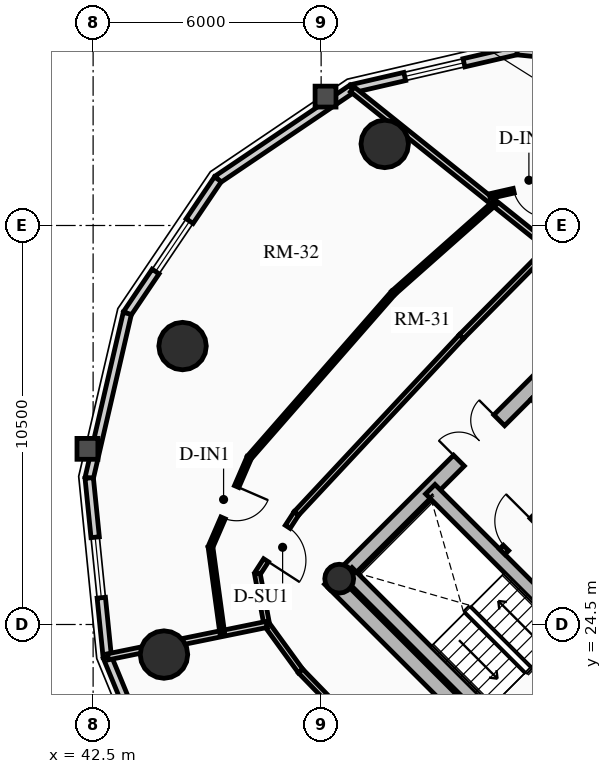
"""IFC4 building model, lengths in metres.
Left out: names, types, materials, properties, quantities, classifications, styles, units other than length and angle.
Written with IfcOpenShell. Run it as: python <this file> out.ifc"""

import sys

from ifc_helpers import new_model, si_unit, direction, frame, frame_2d, origin, origin_2d, place, context, subcontext, project, spatial, rectangle, circle, hollow_circle, extrude, source, transform, mapped, element, fill, save


model = new_model("IFC4")
c1 = context("Model", 3, precision=1e-05, world=origin(), true_north=direction((0.0, 1.0)))
c2 = subcontext(c1, "Body", "Model", "MODEL_VIEW")
j1 = project(units=[si_unit("LENGTHUNIT", "METRE"), si_unit("PLANEANGLEUNIT", "RADIAN")], contexts=[c1])
p1 = place(None, origin())
s1 = spatial("IfcSite", under=j1, at=p1, CompositionType="ELEMENT")
p2 = place(p1, origin())
s2 = spatial("IfcBuilding", under=s1, at=p2, CompositionType="ELEMENT")
p3 = place(p2, frame((0.0, 0.0, 174.88)))
s3 = spatial("IfcBuildingStorey", under=s2, at=p3, CompositionType="ELEMENT", Elevation=174.88)
p4 = place(p3, frame((58.702, 15.732, 0.0), z_axis=(0.0, 0.0, 1.0), x_axis=(-0.707106781187, 0.707106781187, 0.0)))
e1 = element("IfcWall", 1, at=p4, inside=s3, PredefinedType="SHEAR", context=c2, shape_type="SweptSolid", body=[
    extrude(rectangle(XDim=14.1, YDim=0.4, at=frame_2d((7.05, 0.0))), origin(), (0.0, 0.0, 1.0), 2.91),
])
p5 = place(p3, frame((48.873, 25.561, 0.0), z_axis=(0.0, 0.0, 1.0), x_axis=(0.707106781187, 0.707106781187, 0.0)))
e2 = element("IfcWall", 2, at=p5, inside=s3, PredefinedType="SHEAR", context=c2, shape_type="SweptSolid", body=[
    extrude(rectangle(XDim=10.7, YDim=0.4, at=frame_2d((5.35, 0.0))), origin(), (0.0, 0.0, 1.0), 2.91),
])
m1 = source(origin(), c2, "Body", "SweptSolid", [
    extrude(rectangle(XDim=1.5, YDim=2.02, at=frame_2d((0.75, 1.01))), frame((0.0, 0.21, 0.0), z_axis=(0.0, -1.0, 0.0), x_axis=(1.0, 0.0, 0.0)), (0.0, 0.0, 1.0), 0.42),
])
p6 = place(p5, frame((4.6, 0.0, 0.0)))
e3 = element("IfcOpeningElement", 3, at=p6, cuts=e2, PredefinedType="OPENING", context=c2, shape_type="MappedRepresentation", body=[
    mapped(m1, transform((0.0, 0.0, 0.0), x_axis=(1.0, 0.0, 0.0), y_axis=(0.0, 1.0, 0.0), z_axis=(0.0, 0.0, 1.0), scale=1.0)),
])
p7 = place(p3, frame((61.06, 18.373, 0.0), z_axis=(0.0, 0.0, 1.0), x_axis=(-0.707106781187, 0.707106781187, 0.0)))
e4 = element("IfcWall", 4, at=p7, inside=s3, PredefinedType="SHEAR", context=c2, shape_type="SweptSolid", body=[
    extrude(rectangle(XDim=13.7, YDim=0.35, at=frame_2d((6.85, 0.0))), origin(), (0.0, 0.0, 1.0), 2.91),
])
m2 = source(origin(), c2, "Body", "SweptSolid", [
    extrude(rectangle(XDim=1.1, YDim=2.015, at=frame_2d((0.55, 1.007))), frame((0.0, 0.185, 0.0), z_axis=(0.0, -1.0, 0.0), x_axis=(1.0, 0.0, 0.0)), (0.0, 0.0, 1.0), 0.37),
])
p8 = place(p7, frame((4.85, 0.0, 0.0)))
e5 = element("IfcOpeningElement", 5, at=p8, cuts=e4, PredefinedType="OPENING", context=c2, shape_type="MappedRepresentation", body=[
    mapped(m2, transform((0.0, 0.0, 0.0), x_axis=(1.0, 0.0, 0.0), y_axis=(0.0, 1.0, 0.0), z_axis=(0.0, 0.0, 1.0), scale=1.0)),
])
p9 = place(p7, frame((0.625, 0.0, 0.0)))
e6 = element("IfcOpeningElement", 6, at=p9, cuts=e4, PredefinedType="OPENING", context=c2, shape_type="MappedRepresentation", body=[
    mapped(m2, transform((0.0, 0.0, 0.0), x_axis=(1.0, 0.0, 0.0), y_axis=(0.0, 1.0, 0.0), z_axis=(0.0, 0.0, 1.0), scale=1.0)),
])
p10 = place(p7, frame((2.625, 0.0, 0.0)))
e7 = element("IfcOpeningElement", 7, at=p10, cuts=e4, PredefinedType="OPENING", context=c2, shape_type="MappedRepresentation", body=[
    mapped(m2, transform((0.0, 0.0, 0.0), x_axis=(1.0, 0.0, 0.0), y_axis=(0.0, 1.0, 0.0), z_axis=(0.0, 0.0, 1.0), scale=1.0)),
])
m3 = source(origin(), c2, "Body", "SweptSolid", [
    extrude(rectangle(XDim=1.15, YDim=2.02, at=frame_2d((0.575, 1.01))), frame((0.0, 0.185, 0.0), z_axis=(0.0, -1.0, 0.0), x_axis=(1.0, 0.0, 0.0)), (0.0, 0.0, 1.0), 0.37),
])
p11 = place(p7, frame((7.27, 0.0, 0.0)))
e8 = element("IfcOpeningElement", 8, at=p11, cuts=e4, PredefinedType="OPENING", context=c2, shape_type="MappedRepresentation", body=[
    mapped(m3, transform((0.0, 0.0, 0.0), x_axis=(1.0, 0.0, 0.0), y_axis=(0.0, 1.0, 0.0), z_axis=(0.0, 0.0, 1.0), scale=1.0)),
])
p12 = place(p3, frame((53.922, 21.141, 0.0), z_axis=(0.0, 0.0, 1.0), x_axis=(-0.707106781187, 0.707106781187, 0.0)))
e9 = element("IfcWall", 9, at=p12, inside=s3, PredefinedType="SHEAR", context=c2, shape_type="SweptSolid", body=[
    extrude(rectangle(XDim=6.695, YDim=0.35, at=frame_2d((3.348, 0.0))), origin(), (0.0, 0.0, 1.0), 2.91),
])
p13 = place(p3, frame((53.784, 21.003, 0.0), z_axis=(0.0, 0.0, 1.0), x_axis=(0.707106781187, 0.707106781187, 0.0)))
e10 = element("IfcWall", 10, at=p13, inside=s3, PredefinedType="SHEAR", context=c2, shape_type="SweptSolid", body=[
    extrude(rectangle(XDim=3.285, YDim=0.35, at=frame_2d((1.643, 0.0))), origin(), (0.0, 0.0, 1.0), 2.91),
])
p14 = place(p3, frame((48.976, 25.706, 0.0), z_axis=(0.0, 0.0, 1.0), x_axis=(0.707106781187, 0.707106781187, 0.0)))
e11 = element("IfcColumn", 11, at=p14, inside=s3, PredefinedType="COLUMN", context=c2, shape_type="SweptSolid", body=[
    extrude(hollow_circle(Radius=0.38, WallThickness=0.032, at=origin_2d()), origin(), (0.0, 0.0, 1.0), 2.91),
])
for number, where, z_axis, x_axis in (
    (12, (50.173, 37.146, 0.0), (0.0, 0.0, 1.0), (1.0, 0.0, 0.0)),
    (13, (44.854, 31.827, 0.0), (0.0, 0.0, 1.0), (1.0, 0.0, 0.0)),
    (14, (44.365, 23.709, 0.0), (0.0, 0.0, 1.0), (1.0, 0.0, 0.0)),
):
    element("IfcColumn", number, at=place(p3, frame(where, z_axis=z_axis, x_axis=x_axis)), inside=s3, PredefinedType="USERDEFINED", context=c2, shape_type="SweptSolid", body=[
        extrude(circle(Radius=0.625, at=origin_2d()), origin(), (0.0, 0.0, 1.0), 2.91),
    ])
p15 = place(p3, frame((53.645, 39.603, 0.0), z_axis=(0.0, 0.0, 1.0), x_axis=(0.994943283129, -0.100438356004, 0.0)))
e15 = element("IfcWall", 15, at=p15, inside=s3, PredefinedType="SOLIDWALL", context=c2, shape_type="SweptSolid", body=[
    extrude(rectangle(XDim=4.733, YDim=0.22, at=frame_2d((2.366, 0.0))), origin(), (0.0, 0.0, 1.0), 2.245),
])
m4 = source(origin(), c2, "Body", "SweptSolid", [
    extrude(rectangle(XDim=1.6, YDim=1.3, at=frame_2d((0.8, 0.65))), frame((0.0, 0.12, 0.0), z_axis=(0.0, -1.0, 0.0), x_axis=(1.0, 0.0, 0.0)), (0.0, 0.0, 1.0), 0.24),
])
p16 = place(p15, frame((1.566, 0.0, 0.65)))
e16 = element("IfcOpeningElement", 16, at=p16, cuts=e15, PredefinedType="OPENING", context=c2, shape_type="MappedRepresentation", body=[
    mapped(m4, transform((0.0, 0.0, 0.0), x_axis=(1.0, 0.0, 0.0), y_axis=(0.0, 1.0, 0.0), z_axis=(0.0, 0.0, 1.0), scale=1.0)),
])
p17 = place(p3, frame((49.313, 38.6, 0.0), z_axis=(0.0, 0.0, 1.0), x_axis=(0.97422620202, 0.22557328587, 0.0)))
e17 = element("IfcWall", 17, at=p17, inside=s3, PredefinedType="SOLIDWALL", context=c2, shape_type="SweptSolid", body=[
    extrude(rectangle(XDim=4.446, YDim=0.22, at=frame_2d((2.223, 0.0))), origin(), (0.0, 0.0, 1.0), 2.245),
])
p18 = place(p17, frame((1.423, 0.0, 0.65)))
e18 = element("IfcOpeningElement", 18, at=p18, cuts=e17, PredefinedType="OPENING", context=c2, shape_type="MappedRepresentation", body=[
    mapped(m4, transform((0.0, 0.0, 0.0), x_axis=(1.0, 0.0, 0.0), y_axis=(0.0, 1.0, 0.0), z_axis=(0.0, 0.0, 1.0), scale=1.0)),
])
p19 = place(p3, frame((45.783, 36.217, 0.0), z_axis=(0.0, 0.0, 1.0), x_axis=(0.828817439852, 0.55951912514, 0.0)))
e19 = element("IfcWall", 19, at=p19, inside=s3, PredefinedType="SOLIDWALL", context=c2, shape_type="SweptSolid", body=[
    extrude(rectangle(XDim=4.259, YDim=0.22, at=frame_2d((2.129, 0.0))), origin(), (0.0, 0.0, 1.0), 2.245),
])
p20 = place(p3, frame((43.4, 32.687, 0.0), z_axis=(0.0, 0.0, 1.0), x_axis=(0.55951912514, 0.828817439852, 0.0)))
e20 = element("IfcWall", 20, at=p20, inside=s3, PredefinedType="SOLIDWALL", context=c2, shape_type="SweptSolid", body=[
    extrude(rectangle(XDim=4.259, YDim=0.22, at=frame_2d((2.129, 0.0))), origin(), (0.0, 0.0, 1.0), 2.245),
])
p21 = place(p20, frame((1.33, 0.0, 0.65)))
e21 = element("IfcOpeningElement", 21, at=p21, cuts=e20, PredefinedType="OPENING", context=c2, shape_type="MappedRepresentation", body=[
    mapped(m4, transform((0.0, 0.0, 0.0), x_axis=(1.0, 0.0, 0.0), y_axis=(0.0, 1.0, 0.0), z_axis=(0.0, 0.0, 1.0), scale=1.0)),
])
p22 = place(p3, frame((42.397, 28.355, 0.0), z_axis=(0.0, 0.0, 1.0), x_axis=(0.22557328587, 0.97422620202, 0.0)))
e22 = element("IfcWall", 22, at=p22, inside=s3, PredefinedType="SOLIDWALL", context=c2, shape_type="SweptSolid", body=[
    extrude(rectangle(XDim=4.446, YDim=0.22, at=frame_2d((2.223, 0.0))), origin(), (0.0, 0.0, 1.0), 2.245),
])
p23 = place(p3, frame((42.873, 23.646, 0.0), z_axis=(0.0, 0.0, 1.0), x_axis=(-0.100438356004, 0.994943283129, 0.0)))
e23 = element("IfcWall", 23, at=p23, inside=s3, PredefinedType="SOLIDWALL", context=c2, shape_type="SweptSolid", body=[
    extrude(rectangle(XDim=4.733, YDim=0.22, at=frame_2d((2.366, 0.0))), origin(), (0.0, 0.0, 1.0), 2.245),
])
p24 = place(p23, frame((1.566, 0.0, 0.65)))
e24 = element("IfcOpeningElement", 24, at=p24, cuts=e23, PredefinedType="OPENING", context=c2, shape_type="MappedRepresentation", body=[
    mapped(m4, transform((0.0, 0.0, 0.0), x_axis=(1.0, 0.0, 0.0), y_axis=(0.0, 1.0, 0.0), z_axis=(0.0, 0.0, 1.0), scale=1.0)),
])
p25 = place(p3, frame((44.78, 19.021, 0.0), z_axis=(0.0, 0.0, 1.0), x_axis=(-0.381196434348, 0.924494066201, 0.0)))
e25 = element("IfcWall", 25, at=p25, inside=s3, PredefinedType="SOLIDWALL", context=c2, shape_type="SweptSolid", body=[
    extrude(rectangle(XDim=5.003, YDim=0.22, at=frame_2d((2.501, 0.0))), origin(), (0.0, 0.0, 1.0), 2.245),
])
p26 = place(p25, frame((1.702, 0.0, 0.65)))
e26 = element("IfcOpeningElement", 26, at=p26, cuts=e25, PredefinedType="OPENING", context=c2, shape_type="MappedRepresentation", body=[
    mapped(m4, transform((0.0, 0.0, 0.0), x_axis=(1.0, 0.0, 0.0), y_axis=(0.0, 1.0, 0.0), z_axis=(0.0, 0.0, 1.0), scale=1.0)),
])
p27 = place(p3, frame((53.264, 26.416, 0.0), z_axis=(0.0, 0.0, 1.0), x_axis=(0.707106781187, 0.707106781187, 0.0)))
e27 = element("IfcWall", 27, at=p27, inside=s3, PredefinedType="PARTITIONING", context=c2, shape_type="SweptSolid", body=[
    extrude(rectangle(XDim=3.28, YDim=0.2, at=frame_2d((1.64, 0.0))), origin(), (0.0, 0.0, 1.0), 2.675),
])
m5 = source(origin(), c2, "Body", "SweptSolid", [
    extrude(rectangle(XDim=1.0, YDim=2.015, at=frame_2d((0.5, 1.007))), frame((0.0, 0.11, 0.0), z_axis=(0.0, -1.0, 0.0), x_axis=(1.0, 0.0, 0.0)), (0.0, 0.0, 1.0), 0.22),
])
p28 = place(p27, frame((0.14, 0.0, 0.0)))
e28 = element("IfcOpeningElement", 28, at=p28, cuts=e27, PredefinedType="OPENING", context=c2, shape_type="MappedRepresentation", body=[
    mapped(m5, transform((0.0, 0.0, 0.0), x_axis=(1.0, 0.0, 0.0), y_axis=(0.0, 1.0, 0.0), z_axis=(0.0, 0.0, 1.0), scale=1.0)),
])
m6 = source(origin(), c2, "Body", "SweptSolid", [
    extrude(rectangle(XDim=0.9, YDim=2.005, at=frame_2d((0.45, 1.002))), frame((0.0, 0.11, 0.0), z_axis=(0.0, -1.0, 0.0), x_axis=(1.0, 0.0, 0.0)), (0.0, 0.0, 1.0), 0.22),
])
p29 = place(p27, frame((2.05, 0.0, 0.0)))
e29 = element("IfcOpeningElement", 29, at=p29, cuts=e27, PredefinedType="OPENING", context=c2, shape_type="MappedRepresentation", body=[
    mapped(m6, transform((0.0, 0.0, 0.0), x_axis=(1.0, 0.0, 0.0), y_axis=(0.0, 1.0, 0.0), z_axis=(0.0, 0.0, 1.0), scale=1.0)),
])
p30 = place(p3, frame((56.839, 27.728, 0.0), z_axis=(0.0, 0.0, 1.0), x_axis=(-0.707106781187, 0.707106781187, 0.0)))
e30 = element("IfcWall", 30, at=p30, inside=s3, PredefinedType="PARTITIONING", context=c2, shape_type="SweptSolid", body=[
    extrude(rectangle(XDim=3.9, YDim=0.16, at=frame_2d((1.95, 0.0))), origin(), (0.0, 0.0, 1.0), 2.675),
])
m7 = source(origin(), c2, "Body", "SweptSolid", [
    extrude(rectangle(XDim=0.9, YDim=2.005, at=frame_2d((0.45, 1.002))), frame((0.0, 0.09, 0.0), z_axis=(0.0, -1.0, 0.0), x_axis=(1.0, 0.0, 0.0)), (0.0, 0.0, 1.0), 0.18),
])
p31 = place(p30, frame((2.2, 0.0, 0.0)))
e31 = element("IfcOpeningElement", 31, at=p31, cuts=e30, PredefinedType="OPENING", context=c2, shape_type="MappedRepresentation", body=[
    mapped(m7, transform((0.0, 0.0, 0.0), x_axis=(1.0, 0.0, 0.0), y_axis=(0.0, 1.0, 0.0), z_axis=(0.0, 0.0, 1.0), scale=1.0)),
])
p32 = place(p3, frame((54.514, 34.422, 0.0), z_axis=(0.0, 0.0, 1.0), x_axis=(-0.703289573518, -0.710903492593, 0.0)))
e32 = element("IfcWall", 32, at=p32, inside=s3, PredefinedType="PARTITIONING", context=c2, shape_type="SweptSolid", body=[
    extrude(rectangle(XDim=3.303, YDim=0.15, at=frame_2d((1.651, 0.0))), origin(), (0.0, 0.0, 1.0), 2.245),
])
p33 = place(p3, frame((52.191, 32.074, 0.0), z_axis=(0.0, 0.0, 1.0), x_axis=(-0.682404362608, -0.730974887321, 0.0)))
e33 = element("IfcWall", 33, at=p33, inside=s3, PredefinedType="PARTITIONING", context=c2, shape_type="SweptSolid", body=[
    extrude(rectangle(XDim=6.364, YDim=0.15, at=frame_2d((3.182, 0.0))), origin(), (0.0, 0.0, 1.0), 2.245),
])
p34 = place(p3, frame((47.849, 27.423, 0.0), z_axis=(0.0, 0.0, 1.0), x_axis=(-0.543529808582, -0.839389866023, 0.0)))
e34 = element("IfcWall", 34, at=p34, inside=s3, PredefinedType="PARTITIONING", context=c2, shape_type="SweptSolid", body=[
    extrude(rectangle(XDim=1.89, YDim=0.15, at=frame_2d((0.945, 0.0))), origin(), (0.0, 0.0, 1.0), 2.245),
])
m8 = source(origin(), c2, "Body", "SweptSolid", [
    extrude(rectangle(XDim=1.05, YDim=2.015, at=frame_2d((0.525, 1.007))), frame((0.0, 0.085, 0.0), z_axis=(0.0, -1.0, 0.0), x_axis=(1.0, 0.0, 0.0)), (0.0, 0.0, 1.0), 0.17),
])
p35 = place(p34, frame((0.42, 0.0, 0.0)))
e35 = element("IfcOpeningElement", 35, at=p35, cuts=e34, PredefinedType="OPENING", context=c2, shape_type="MappedRepresentation", body=[
    mapped(m8, transform((0.0, 0.0, 0.0), x_axis=(1.0, 0.0, 0.0), y_axis=(0.0, 1.0, 0.0), z_axis=(0.0, 0.0, 1.0), scale=1.0)),
])
p36 = place(p3, frame((46.822, 25.836, 0.0), z_axis=(0.0, 0.0, 1.0), x_axis=(0.182115036249, -0.983277231289, 0.0)))
e36 = element("IfcWall", 36, at=p36, inside=s3, PredefinedType="PARTITIONING", context=c2, shape_type="SweptSolid", body=[
    extrude(rectangle(XDim=1.357, YDim=0.15, at=frame_2d((0.678, 0.0))), origin(), (0.0, 0.0, 1.0), 2.245),
])
p37 = place(p3, frame((47.069, 24.502, 0.0), z_axis=(0.0, 0.0, 1.0), x_axis=(0.587577436866, -0.809167940347, 0.0)))
e37 = element("IfcWall", 37, at=p37, inside=s3, PredefinedType="PARTITIONING", context=c2, shape_type="SweptSolid", body=[
    extrude(rectangle(XDim=1.515, YDim=0.15, at=frame_2d((0.757, 0.0))), origin(), (0.0, 0.0, 1.0), 2.245),
])
p38 = place(p3, frame((47.959, 23.277, 0.0), z_axis=(0.0, 0.0, 1.0), x_axis=(0.696422573496, -0.717631938479, 0.0)))
e38 = element("IfcWall", 38, at=p38, inside=s3, PredefinedType="PARTITIONING", context=c2, shape_type="SweptSolid", body=[
    extrude(rectangle(XDim=5.882, YDim=0.15, at=frame_2d((2.941, 0.0))), origin(), (0.0, 0.0, 1.0), 2.675),
])
m9 = source(origin(), c2, "Body", "SweptSolid", [
    extrude(rectangle(XDim=1.0, YDim=2.015, at=frame_2d((0.5, 1.007))), frame((0.0, 0.085, 0.0), z_axis=(0.0, -1.0, 0.0), x_axis=(1.0, 0.0, 0.0)), (0.0, 0.0, 1.0), 0.17),
])
p39 = place(p38, frame((2.441, 0.0, 0.0)))
e39 = element("IfcOpeningElement", 39, at=p39, cuts=e38, PredefinedType="OPENING", context=c2, shape_type="MappedRepresentation", body=[
    mapped(m9, transform((0.0, 0.0, 0.0), x_axis=(1.0, 0.0, 0.0), y_axis=(0.0, 1.0, 0.0), z_axis=(0.0, 0.0, 1.0), scale=1.0)),
])
p40 = place(p3, frame((54.514, 34.422, 0.0), z_axis=(0.0, 0.0, 1.0), x_axis=(-0.780385234796, 0.625299036712, 0.0)))
e40 = element("IfcWall", 40, at=p40, inside=s3, PredefinedType="PARTITIONING", context=c2, shape_type="SweptSolid", body=[
    extrude(rectangle(XDim=6.653, YDim=0.16, at=frame_2d((3.326, 0.0))), origin(), (0.0, 0.0, 1.0), 2.245),
])
p41 = place(p3, frame((47.069, 24.502, 0.0), z_axis=(0.0, 0.0, 1.0), x_axis=(-0.979772902724, -0.200112616012, 0.0)))
e41 = element("IfcWall", 41, at=p41, inside=s3, PredefinedType="PARTITIONING", context=c2, shape_type="SweptSolid", body=[
    extrude(rectangle(XDim=4.263, YDim=0.16, at=frame_2d((2.131, 0.0))), origin(), (0.0, 0.0, 1.0), 2.245),
])
p42 = place(p3, frame((54.871, 36.211, 0.0), z_axis=(0.0, 0.0, 1.0), x_axis=(-0.975212623293, -0.221269833846, 0.0)))
e42 = element("IfcWall", 42, at=p42, inside=s3, PredefinedType="PARTITIONING", context=c2, shape_type="SweptSolid", body=[
    extrude(rectangle(XDim=1.983, YDim=0.125, at=frame_2d((0.991, 0.0))), origin(), (0.0, 0.0, 1.0), 2.312),
])
m10 = source(origin(), c2, "Body", "SweptSolid", [
    extrude(rectangle(XDim=0.9, YDim=2.005, at=frame_2d((0.45, 1.002))), frame((0.0, 0.073, 0.0), z_axis=(0.0, -1.0, 0.0), x_axis=(1.0, 0.0, 0.0)), (0.0, 0.0, 1.0), 0.145),
])
p43 = place(p42, frame((0.436, 0.0, 0.0)))
e43 = element("IfcOpeningElement", 43, at=p43, cuts=e42, PredefinedType="OPENING", context=c2, shape_type="MappedRepresentation", body=[
    mapped(m10, transform((0.0, 0.0, 0.0), x_axis=(1.0, 0.0, 0.0), y_axis=(0.0, 1.0, 0.0), z_axis=(0.0, 0.0, 1.0), scale=1.0)),
])
p44 = place(p3, frame((53.06, 35.587, 0.0), z_axis=(0.0, 0.0, 1.0), x_axis=(-0.748390346028, -0.663258539314, 0.0)))
e44 = element("IfcWall", 44, at=p44, inside=s3, PredefinedType="PARTITIONING", context=c2, shape_type="SweptSolid", body=[
    extrude(rectangle(XDim=3.553, YDim=0.125, at=frame_2d((1.777, 0.0))), origin(), (0.0, 0.0, 1.0), 2.245),
])
p45 = place(p3, frame((50.401, 33.23, 0.0), z_axis=(0.0, 0.0, 1.0), x_axis=(-0.658387591096, -0.752679068322, 0.0)))
e45 = element("IfcWall", 45, at=p45, inside=s3, PredefinedType="PARTITIONING", context=c2, shape_type="SweptSolid", body=[
    extrude(rectangle(XDim=5.761, YDim=0.125, at=frame_2d((2.88, 0.0))), origin(), (0.0, 0.0, 1.0), 2.245),
])
p46 = place(p3, frame((46.608, 28.894, 0.0), z_axis=(0.0, 0.0, 1.0), x_axis=(-0.397650183672, -0.917537100844, 0.0)))
e46 = element("IfcWall", 46, at=p46, inside=s3, PredefinedType="PARTITIONING", context=c2, shape_type="SweptSolid", body=[
    extrude(rectangle(XDim=2.564, YDim=0.125, at=frame_2d((1.282, 0.0))), origin(), (0.0, 0.0, 1.0), 2.245),
])
p47 = place(p46, frame((0.832, 0.0, 0.0)))
e47 = element("IfcOpeningElement", 47, at=p47, cuts=e46, PredefinedType="OPENING", context=c2, shape_type="MappedRepresentation", body=[
    mapped(m10, transform((0.0, 0.0, 0.0), x_axis=(1.0, 0.0, 0.0), y_axis=(0.0, 1.0, 0.0), z_axis=(0.0, 0.0, 1.0), scale=1.0)),
])
p48 = place(p3, frame((45.588, 26.541, 0.0), z_axis=(0.0, 0.0, 1.0), x_axis=(0.135321759641, -0.990801706381, 0.0)))
e48 = element("IfcWall", 48, at=p48, inside=s3, PredefinedType="PARTITIONING", context=c2, shape_type="SweptSolid", body=[
    extrude(rectangle(XDim=2.299, YDim=0.125, at=frame_2d((1.149, 0.0))), origin(), (0.0, 0.0, 1.0), 2.245),
])
m11 = source(origin(), c2, "Body", "SweptSolid", [
    extrude(rectangle(XDim=1.6, YDim=1.3, at=frame_2d((0.8, 0.65))), frame((0.0, 0.03, 0.0), z_axis=(0.0, -1.0, 0.0), x_axis=(1.0, 0.0, 0.0)), (0.0, 0.0, 1.0), 0.06),
])
p49 = place(p18, origin())
e49 = element("IfcWindow", 49, at=p49, inside=s3, PartitioningType="SINGLE_PANEL", PredefinedType="WINDOW", context=c2, shape_type="MappedRepresentation", body=[
    mapped(m11, transform((0.0, 0.0, 0.0), x_axis=(1.0, 0.0, 0.0), y_axis=(0.0, 1.0, 0.0), z_axis=(0.0, 0.0, 1.0), scale=1.0)),
])
fill(e18, e49)
p50 = place(p21, origin())
e50 = element("IfcWindow", 50, at=p50, inside=s3, PartitioningType="SINGLE_PANEL", PredefinedType="WINDOW", context=c2, shape_type="MappedRepresentation", body=[
    mapped(m11, transform((0.0, 0.0, 0.0), x_axis=(1.0, 0.0, 0.0), y_axis=(0.0, 1.0, 0.0), z_axis=(0.0, 0.0, 1.0), scale=1.0)),
])
fill(e21, e50)
p51 = place(p24, origin())
e51 = element("IfcWindow", 51, at=p51, inside=s3, PartitioningType="SINGLE_PANEL", PredefinedType="WINDOW", context=c2, shape_type="MappedRepresentation", body=[
    mapped(m11, transform((0.0, 0.0, 0.0), x_axis=(1.0, 0.0, 0.0), y_axis=(0.0, 1.0, 0.0), z_axis=(0.0, 0.0, 1.0), scale=1.0)),
])
fill(e24, e51)
m12 = source(origin(), c2, "Body", "SweptSolid", [
    extrude(rectangle(XDim=1.5, YDim=2.02, at=frame_2d((0.75, 1.01))), frame((0.0, 0.025, 0.0), z_axis=(0.0, -1.0, 0.0), x_axis=(1.0, 0.0, 0.0)), (0.0, 0.0, 1.0), 0.05),
])
p52 = place(p6, origin())
e52 = element("IfcDoor", 52, at=p52, inside=s3, OperationType="DOUBLE_DOOR_SINGLE_SWING", PredefinedType="DOOR", context=c2, shape_type="MappedRepresentation", body=[
    mapped(m12, transform((0.0, 0.0, 0.0), x_axis=(1.0, 0.0, 0.0), y_axis=(0.0, 1.0, 0.0), z_axis=(0.0, 0.0, 1.0), scale=1.0)),
])
fill(e3, e52)
m13 = source(origin(), c2, "Body", "SweptSolid", [
    extrude(rectangle(XDim=1.0, YDim=2.015, at=frame_2d((0.5, 1.007))), frame((0.0, 0.025, 0.0), z_axis=(0.0, -1.0, 0.0), x_axis=(1.0, 0.0, 0.0)), (0.0, 0.0, 1.0), 0.05),
])
p53 = place(p28, origin())
e53 = element("IfcDoor", 53, at=p53, inside=s3, OperationType="SINGLE_SWING_RIGHT", PredefinedType="DOOR", context=c2, shape_type="MappedRepresentation", body=[
    mapped(m13, transform((0.0, 0.0, 0.0), x_axis=(1.0, 0.0, 0.0), y_axis=(0.0, 1.0, 0.0), z_axis=(0.0, 0.0, 1.0), scale=1.0)),
])
fill(e28, e53)
m14 = source(origin(), c2, "Body", "SweptSolid", [
    extrude(rectangle(XDim=0.9, YDim=2.005, at=frame_2d((0.45, 1.002))), frame((0.0, 0.025, 0.0), z_axis=(0.0, -1.0, 0.0), x_axis=(1.0, 0.0, 0.0)), (0.0, 0.0, 1.0), 0.05),
])
p54 = place(p43, origin())
e54 = element("IfcDoor", 54, at=p54, inside=s3, OperationType="SINGLE_SWING_LEFT", PredefinedType="DOOR", context=c2, shape_type="MappedRepresentation", body=[
    mapped(m14, transform((0.0, 0.0, 0.0), x_axis=(1.0, 0.0, 0.0), y_axis=(0.0, 1.0, 0.0), z_axis=(0.0, 0.0, 1.0), scale=1.0)),
])
fill(e43, e54)
m15 = source(origin(), c2, "Body", "SweptSolid", [
    extrude(rectangle(XDim=1.05, YDim=2.015, at=frame_2d((0.525, 1.007))), frame((0.0, 0.025, 0.0), z_axis=(0.0, -1.0, 0.0), x_axis=(1.0, 0.0, 0.0)), (0.0, 0.0, 1.0), 0.05),
])
p55 = place(p35, origin())
e55 = element("IfcDoor", 55, at=p55, inside=s3, OperationType="SINGLE_SWING_RIGHT", PredefinedType="DOOR", context=c2, shape_type="MappedRepresentation", body=[
    mapped(m15, transform((0.0, 0.0, 0.0), x_axis=(1.0, 0.0, 0.0), y_axis=(0.0, 1.0, 0.0), z_axis=(0.0, 0.0, 1.0), scale=1.0)),
])
fill(e35, e55)
p56 = place(p47, origin())
e56 = element("IfcDoor", 56, at=p56, inside=s3, OperationType="SINGLE_SWING_LEFT", PredefinedType="DOOR", context=c2, shape_type="MappedRepresentation", body=[
    mapped(m14, transform((0.0, 0.0, 0.0), x_axis=(1.0, 0.0, 0.0), y_axis=(0.0, 1.0, 0.0), z_axis=(0.0, 0.0, 1.0), scale=1.0)),
])
fill(e47, e56)
save(model, sys.argv[1])
